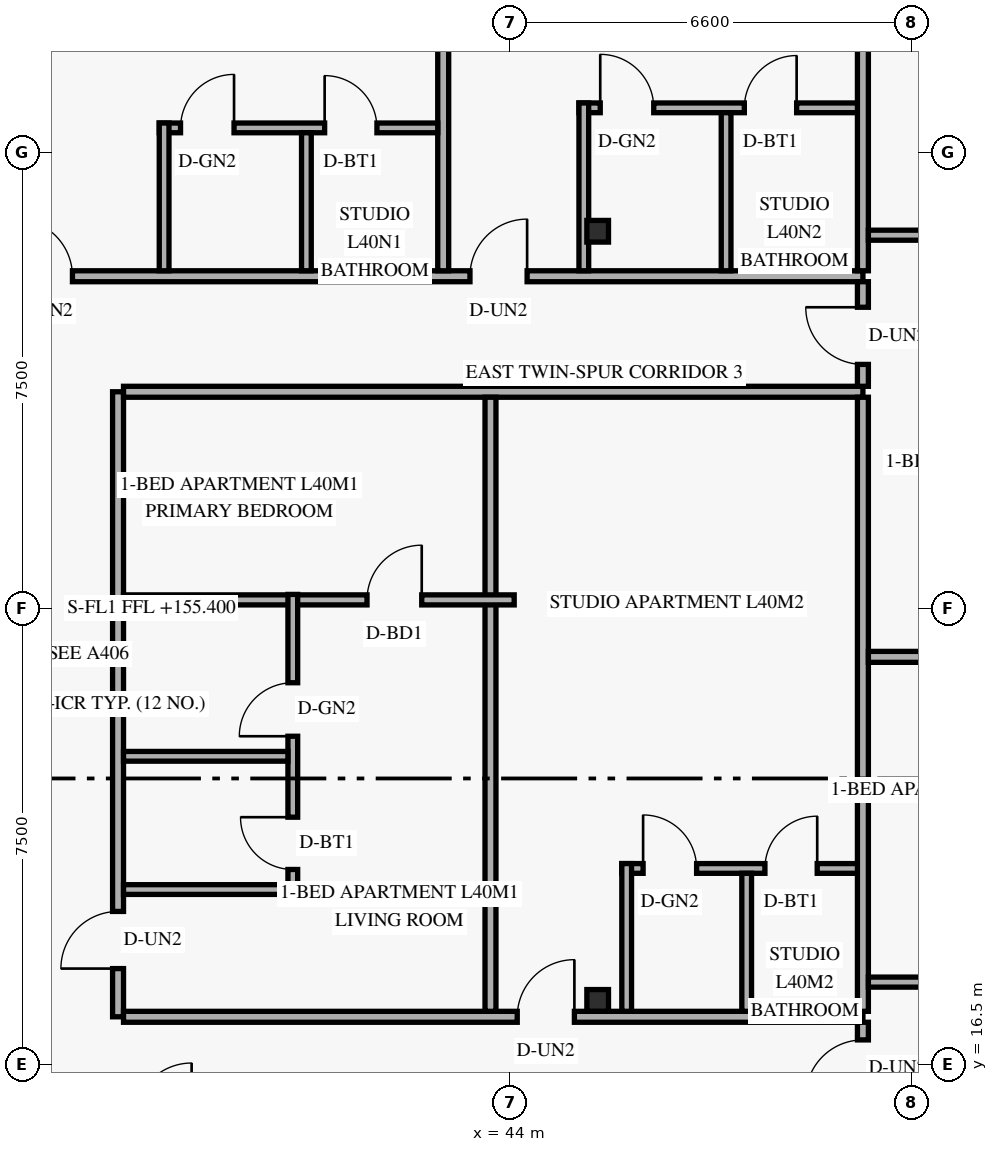
"""IFC4 building model, lengths in metres.
Left out: names, types, materials, properties, quantities, classifications, styles, units other than length and angle.
Written with IfcOpenShell. Run it as: python <this file> out.ifc"""

import sys

from ifc_helpers import new_model, si_unit, direction, frame, frame_2d, origin, origin_2d, place, context, subcontext, project, spatial, rectangle, hollow_rectangle, extrude, element, fill, save


model = new_model("IFC4")
c1 = context("Model", 3, precision=1e-05, world=origin(), true_north=direction((0.0, 1.0)))
c2 = subcontext(c1, "Body", "Model", "MODEL_VIEW")
j1 = project(units=[si_unit("LENGTHUNIT", "METRE"), si_unit("PLANEANGLEUNIT", "RADIAN")], contexts=[c1])
p1 = place(None, origin())
s1 = spatial("IfcSite", under=j1, at=p1, CompositionType="ELEMENT")
p2 = place(p1, origin())
s2 = spatial("IfcBuilding", under=s1, at=p2, CompositionType="ELEMENT")
p3 = place(p2, frame((0.0, 0.0, 155.4)))
s3 = spatial("IfcBuildingStorey", under=s2, at=p3, CompositionType="ELEMENT", Elevation=155.4)
for number, where, z_axis, x_axis in (
    (1, (45.375, 17.55, 0.0), (0.035, 0.0, 0.999), (0.0, 1.0, 0.0)),
    (2, (45.375, 30.2, 0.0), (0.035, 0.0, 0.999), (0.0, 1.0, 0.0)),
):
    element("IfcColumn", number, at=place(p3, frame(where, z_axis=z_axis, x_axis=x_axis)), inside=s3, PredefinedType="COLUMN", context=c2, shape_type="SweptSolid", body=[
        extrude(hollow_rectangle(XDim=0.356, YDim=0.356, WallThickness=0.016, at=origin_2d()), origin(), (0.0, 0.0, 1.0), 3.602),
    ])
p4 = place(p3, frame((37.55, 17.28, 0.0), z_axis=(0.0, 0.0, 1.0), x_axis=(0.0, 1.0, 0.0)))
e3 = element("IfcWall", 3, at=p4, inside=s3, PredefinedType="STANDARD", context=c2, shape_type="SweptSolid", body=[
    extrude(rectangle(XDim=10.28, YDim=0.18, at=frame_2d((5.14, 0.0))), origin(), (0.0, 0.0, 1.0), 2.73),
])
p5 = place(p4, frame((0.793, 0.0, 0.0)))
e4 = element("IfcOpeningElement", 4, at=p5, cuts=e3, PredefinedType="OPENING", context=c2, shape_type="SweptSolid", body=[
    extrude(rectangle(XDim=0.94, YDim=2.15, at=frame_2d((0.47, 1.075))), frame((0.0, 0.1, 0.0), z_axis=(0.0, -1.0, 0.0), x_axis=(1.0, 0.0, 0.0)), (0.0, 0.0, 1.0), 0.2),
])
p6 = place(p3, frame((37.64, 17.28, 0.0), z_axis=(0.0, 0.0, 1.0), x_axis=(1.0, 0.0, 0.0)))
e5 = element("IfcWall", 5, at=p6, inside=s3, PredefinedType="STANDARD", context=c2, shape_type="SweptSolid", body=[
    extrude(rectangle(XDim=12.16, YDim=0.18, at=frame_2d((6.08, 0.0))), origin(), (0.0, 0.0, 1.0), 2.73),
])
p7 = place(p6, frame((6.475, 0.0, 0.0)))
e6 = element("IfcOpeningElement", 6, at=p7, cuts=e5, PredefinedType="OPENING", context=c2, shape_type="SweptSolid", body=[
    extrude(rectangle(XDim=0.94, YDim=2.15, at=frame_2d((0.47, 1.075))), frame((0.0, 0.1, 0.0), z_axis=(0.0, -1.0, 0.0), x_axis=(1.0, 0.0, 0.0)), (0.0, 0.0, 1.0), 0.2),
])
p8 = place(p3, frame((37.64, 27.56, 0.0), z_axis=(0.0, 0.0, 1.0), x_axis=(1.0, 0.0, 0.0)))
e7 = element("IfcWall", 7, at=p8, inside=s3, PredefinedType="STANDARD", context=c2, shape_type="SweptSolid", body=[
    extrude(rectangle(XDim=12.16, YDim=0.18, at=frame_2d((6.08, 0.0))), origin(), (0.0, 0.0, 1.0), 2.73),
])
p9 = place(p3, frame((35.51, 29.46, 0.0), z_axis=(0.0, 0.0, 1.0), x_axis=(1.0, 0.0, 0.0)))
e8 = element("IfcWall", 8, at=p9, inside=s3, PredefinedType="STANDARD", context=c2, shape_type="SweptSolid", body=[
    extrude(rectangle(XDim=14.29, YDim=0.18, at=frame_2d((7.145, 0.0))), origin(), (0.0, 0.0, 1.0), 2.73),
])
p10 = place(p9, frame((0.35, 0.0, 0.0)))
e9 = element("IfcOpeningElement", 9, at=p10, cuts=e8, PredefinedType="OPENING", context=c2, shape_type="SweptSolid", body=[
    extrude(rectangle(XDim=0.94, YDim=2.15, at=frame_2d((0.47, 1.075))), frame((0.0, 0.1, 0.0), z_axis=(0.0, -1.0, 0.0), x_axis=(1.0, 0.0, 0.0)), (0.0, 0.0, 1.0), 0.2),
])
p11 = place(p9, frame((7.828, 0.0, 0.0)))
e10 = element("IfcOpeningElement", 10, at=p11, cuts=e8, PredefinedType="OPENING", context=c2, shape_type="SweptSolid", body=[
    extrude(rectangle(XDim=0.94, YDim=2.15, at=frame_2d((0.47, 1.075))), frame((0.0, 0.1, 0.0), z_axis=(0.0, -1.0, 0.0), x_axis=(1.0, 0.0, 0.0)), (0.0, 0.0, 1.0), 0.2),
])
p12 = place(p3, frame((42.898, 29.55, 0.0), z_axis=(0.0, 0.0, 1.0), x_axis=(0.0, 1.0, 0.0)))
e11 = element("IfcWall", 11, at=p12, inside=s3, PredefinedType="PARTITIONING", context=c2, shape_type="SweptSolid", body=[
    extrude(rectangle(XDim=14.17, YDim=0.18, at=frame_2d((7.085, 0.0))), origin(), (0.0, 0.0, 1.0), 2.73),
])
p13 = place(p3, frame((38.228, 31.9, 0.0), z_axis=(0.0, 0.0, 1.0), x_axis=(1.0, 0.0, 0.0)))
e12 = element("IfcWall", 12, at=p13, inside=s3, PredefinedType="PLUMBINGWALL", context=c2, shape_type="SweptSolid", body=[
    extrude(rectangle(XDim=4.58, YDim=0.16, at=frame_2d((2.29, 0.0))), origin(), (0.0, 0.0, 1.0), 3.36),
])
p14 = place(p13, frame((0.35, 0.0, 0.0)))
e13 = element("IfcOpeningElement", 13, at=p14, cuts=e12, PredefinedType="OPENING", context=c2, shape_type="SweptSolid", body=[
    extrude(rectangle(XDim=0.88, YDim=2.12, at=frame_2d((0.44, 1.06))), frame((0.0, 0.09, 0.0), z_axis=(0.0, -1.0, 0.0), x_axis=(1.0, 0.0, 0.0)), (0.0, 0.0, 1.0), 0.18),
])
p15 = place(p13, frame((2.72, 0.0, 0.0)))
e14 = element("IfcOpeningElement", 14, at=p15, cuts=e12, PredefinedType="OPENING", context=c2, shape_type="SweptSolid", body=[
    extrude(rectangle(XDim=0.86, YDim=2.12, at=frame_2d((0.43, 1.06))), frame((0.0, 0.09, 0.0), z_axis=(0.0, -1.0, 0.0), x_axis=(1.0, 0.0, 0.0)), (0.0, 0.0, 1.0), 0.18),
])
p16 = place(p3, frame((38.308, 29.55, 0.0), z_axis=(0.0, 0.0, 1.0), x_axis=(0.0, 1.0, 0.0)))
e15 = element("IfcWall", 15, at=p16, inside=s3, PredefinedType="PLUMBINGWALL", context=c2, shape_type="SweptSolid", body=[
    extrude(rectangle(XDim=2.43, YDim=0.16, at=frame_2d((1.215, 0.0))), origin(), (0.0, 0.0, 1.0), 2.73),
])
p17 = place(p3, frame((40.648, 29.55, 0.0), z_axis=(0.0, 0.0, 1.0), x_axis=(0.0, 1.0, 0.0)))
e16 = element("IfcWall", 16, at=p17, inside=s3, PredefinedType="PLUMBINGWALL", context=c2, shape_type="SweptSolid", body=[
    extrude(rectangle(XDim=2.27, YDim=0.16, at=frame_2d((1.135, 0.0))), origin(), (0.0, 0.0, 1.0), 2.73),
])
p18 = place(p3, frame((45.13, 32.23, 0.0), z_axis=(0.0, 0.0, 1.0), x_axis=(1.0, 0.0, 0.0)))
e17 = element("IfcWall", 17, at=p18, inside=s3, PredefinedType="PLUMBINGWALL", context=c2, shape_type="SweptSolid", body=[
    extrude(rectangle(XDim=4.67, YDim=0.16, at=frame_2d((2.335, 0.0))), origin(), (0.0, 0.0, 1.0), 2.73),
])
p19 = place(p18, frame((0.35, 0.0, 0.0)))
e18 = element("IfcOpeningElement", 18, at=p19, cuts=e17, PredefinedType="OPENING", context=c2, shape_type="SweptSolid", body=[
    extrude(rectangle(XDim=0.88, YDim=2.12, at=frame_2d((0.44, 1.06))), frame((0.0, 0.09, 0.0), z_axis=(0.0, -1.0, 0.0), x_axis=(1.0, 0.0, 0.0)), (0.0, 0.0, 1.0), 0.18),
])
p20 = place(p18, frame((2.72, 0.0, 0.0)))
e19 = element("IfcOpeningElement", 19, at=p20, cuts=e17, PredefinedType="OPENING", context=c2, shape_type="SweptSolid", body=[
    extrude(rectangle(XDim=0.86, YDim=2.12, at=frame_2d((0.43, 1.06))), frame((0.0, 0.09, 0.0), z_axis=(0.0, -1.0, 0.0), x_axis=(1.0, 0.0, 0.0)), (0.0, 0.0, 1.0), 0.18),
])
p21 = place(p3, frame((45.21, 29.55, 0.0), z_axis=(0.0, 0.0, 1.0), x_axis=(0.0, 1.0, 0.0)))
e20 = element("IfcWall", 20, at=p21, inside=s3, PredefinedType="PLUMBINGWALL", context=c2, shape_type="SweptSolid", body=[
    extrude(rectangle(XDim=2.76, YDim=0.16, at=frame_2d((1.38, 0.0))), origin(), (0.0, 0.0, 1.0), 2.73),
])
p22 = place(p3, frame((47.55, 29.55, 0.0), z_axis=(0.0, 0.0, 1.0), x_axis=(0.0, 1.0, 0.0)))
e21 = element("IfcWall", 21, at=p22, inside=s3, PredefinedType="PLUMBINGWALL", context=c2, shape_type="SweptSolid", body=[
    extrude(rectangle(XDim=2.6, YDim=0.16, at=frame_2d((1.3, 0.0))), origin(), (0.0, 0.0, 1.0), 2.73),
])
p23 = place(p3, frame((43.675, 17.37, 0.0), z_axis=(0.0, 0.0, 1.0), x_axis=(0.0, 1.0, 0.0)))
e22 = element("IfcWall", 22, at=p23, inside=s3, PredefinedType="PARTITIONING", context=c2, shape_type="SweptSolid", body=[
    extrude(rectangle(XDim=10.1, YDim=0.18, at=frame_2d((5.05, 0.0))), origin(), (0.0, 0.0, 1.0), 2.73),
])
p24 = place(p3, frame((37.64, 24.137, 0.0), z_axis=(0.0, 0.0, 1.0), x_axis=(1.0, 0.0, 0.0)))
e23 = element("IfcWall", 23, at=p24, inside=s3, PredefinedType="PARTITIONING", context=c2, shape_type="SweptSolid", body=[
    extrude(rectangle(XDim=6.425, YDim=0.165, at=frame_2d((3.212, 0.0))), origin(), (0.0, 0.0, 1.0), 3.36),
])
p25 = place(p24, frame((4.004, 0.0, 0.0)))
e24 = element("IfcOpeningElement", 24, at=p25, cuts=e23, PredefinedType="OPENING", context=c2, shape_type="SweptSolid", body=[
    extrude(rectangle(XDim=0.9, YDim=2.14, at=frame_2d((0.45, 1.07))), frame((0.0, 0.093, 0.0), z_axis=(0.0, -1.0, 0.0), x_axis=(1.0, 0.0, 0.0)), (0.0, 0.0, 1.0), 0.185),
])
p26 = place(p3, frame((37.64, 19.373, 0.0), z_axis=(0.0, 0.0, 1.0), x_axis=(1.0, 0.0, 0.0)))
e25 = element("IfcWall", 25, at=p26, inside=s3, PredefinedType="PLUMBINGWALL", context=c2, shape_type="SweptSolid", body=[
    extrude(rectangle(XDim=2.864, YDim=0.16, at=frame_2d((1.432, 0.0))), origin(), (0.0, 0.0, 1.0), 3.36),
])
p27 = place(p3, frame((40.424, 19.283, 0.0), z_axis=(0.0, 0.0, 1.0), x_axis=(0.0, 1.0, 0.0)))
e26 = element("IfcWall", 26, at=p27, inside=s3, PredefinedType="PLUMBINGWALL", context=c2, shape_type="SweptSolid", body=[
    extrude(rectangle(XDim=4.944, YDim=0.16, at=frame_2d((2.472, 0.0))), origin(), (0.0, 0.0, 1.0), 3.36),
])
p28 = place(p27, frame((0.42, 0.0, 0.0)))
e27 = element("IfcOpeningElement", 27, at=p28, cuts=e26, PredefinedType="OPENING", context=c2, shape_type="SweptSolid", body=[
    extrude(rectangle(XDim=0.86, YDim=2.12, at=frame_2d((0.43, 1.06))), frame((0.0, 0.09, 0.0), z_axis=(0.0, -1.0, 0.0), x_axis=(1.0, 0.0, 0.0)), (0.0, 0.0, 1.0), 0.18),
])
p29 = place(p27, frame((2.611, 0.0, 0.0)))
e28 = element("IfcOpeningElement", 28, at=p29, cuts=e26, PredefinedType="OPENING", context=c2, shape_type="SweptSolid", body=[
    extrude(rectangle(XDim=0.88, YDim=2.12, at=frame_2d((0.44, 1.06))), frame((0.0, 0.09, 0.0), z_axis=(0.0, -1.0, 0.0), x_axis=(1.0, 0.0, 0.0)), (0.0, 0.0, 1.0), 0.18),
])
p30 = place(p3, frame((37.64, 21.564, 0.0), z_axis=(0.0, 0.0, 1.0), x_axis=(1.0, 0.0, 0.0)))
e29 = element("IfcWall", 29, at=p30, inside=s3, PredefinedType="PLUMBINGWALL", context=c2, shape_type="SweptSolid", body=[
    extrude(rectangle(XDim=2.704, YDim=0.16, at=frame_2d((1.352, 0.0))), origin(), (0.0, 0.0, 1.0), 3.36),
])
p31 = place(p3, frame((45.835, 19.72, 0.0), z_axis=(0.0, 0.0, 1.0), x_axis=(1.0, 0.0, 0.0)))
e30 = element("IfcWall", 30, at=p31, inside=s3, PredefinedType="PLUMBINGWALL", context=c2, shape_type="SweptSolid", body=[
    extrude(rectangle(XDim=3.965, YDim=0.16, at=frame_2d((1.982, 0.0))), origin(), (0.0, 0.0, 1.0), 3.36),
])
p32 = place(p31, frame((0.35, 0.0, 0.0)))
e31 = element("IfcOpeningElement", 31, at=p32, cuts=e30, PredefinedType="OPENING", context=c2, shape_type="SweptSolid", body=[
    extrude(rectangle(XDim=0.88, YDim=2.12, at=frame_2d((0.44, 1.06))), frame((0.0, 0.09, 0.0), z_axis=(0.0, -1.0, 0.0), x_axis=(1.0, 0.0, 0.0)), (0.0, 0.0, 1.0), 0.18),
])
p33 = place(p31, frame((2.354, 0.0, 0.0)))
e32 = element("IfcOpeningElement", 32, at=p33, cuts=e30, PredefinedType="OPENING", context=c2, shape_type="SweptSolid", body=[
    extrude(rectangle(XDim=0.86, YDim=2.12, at=frame_2d((0.43, 1.06))), frame((0.0, 0.09, 0.0), z_axis=(0.0, -1.0, 0.0), x_axis=(1.0, 0.0, 0.0)), (0.0, 0.0, 1.0), 0.18),
])
p34 = place(p3, frame((45.915, 17.37, 0.0), z_axis=(0.0, 0.0, 1.0), x_axis=(0.0, 1.0, 0.0)))
e33 = element("IfcWall", 33, at=p34, inside=s3, PredefinedType="PLUMBINGWALL", context=c2, shape_type="SweptSolid", body=[
    extrude(rectangle(XDim=2.43, YDim=0.16, at=frame_2d((1.215, 0.0))), origin(), (0.0, 0.0, 1.0), 2.73),
])
p35 = place(p3, frame((47.888, 17.37, 0.0), z_axis=(0.0, 0.0, 1.0), x_axis=(0.0, 1.0, 0.0)))
e34 = element("IfcWall", 34, at=p35, inside=s3, PredefinedType="PLUMBINGWALL", context=c2, shape_type="SweptSolid", body=[
    extrude(rectangle(XDim=2.27, YDim=0.16, at=frame_2d((1.135, 0.0))), origin(), (0.0, 0.0, 1.0), 2.73),
])
p36 = place(p3, frame((49.8, 15.67, 0.0), z_axis=(0.0, 0.0, 1.0), x_axis=(0.0, 1.0, 0.0)))
e35 = element("IfcWall", 35, at=p36, inside=s3, PredefinedType="STANDARD", context=c2, shape_type="SweptSolid", body=[
    extrude(rectangle(XDim=1.52, YDim=0.18, at=frame_2d((0.76, 0.0))), origin(), (0.0, 0.0, 1.0), 3.36),
])
p37 = place(p36, frame((0.29, 0.0, 0.0)))
e36 = element("IfcOpeningElement", 36, at=p37, cuts=e35, PredefinedType="OPENING", context=c2, shape_type="SweptSolid", body=[
    extrude(rectangle(XDim=0.94, YDim=2.15, at=frame_2d((0.47, 1.075))), frame((0.0, 0.1, 0.0), z_axis=(0.0, -1.0, 0.0), x_axis=(1.0, 0.0, 0.0)), (0.0, 0.0, 1.0), 0.2),
])
p38 = place(p3, frame((49.8, 27.65, 0.0), z_axis=(0.0, 0.0, 1.0), x_axis=(0.0, 1.0, 0.0)))
e37 = element("IfcWall", 37, at=p38, inside=s3, PredefinedType="STANDARD", context=c2, shape_type="SweptSolid", body=[
    extrude(rectangle(XDim=1.72, YDim=0.18, at=frame_2d((0.86, 0.0))), origin(), (0.0, 0.0, 1.0), 3.36),
])
p39 = place(p38, frame((0.36, 0.0, 0.0)))
e38 = element("IfcOpeningElement", 38, at=p39, cuts=e37, PredefinedType="OPENING", context=c2, shape_type="SweptSolid", body=[
    extrude(rectangle(XDim=0.94, YDim=2.15, at=frame_2d((0.47, 1.075))), frame((0.0, 0.1, 0.0), z_axis=(0.0, -1.0, 0.0), x_axis=(1.0, 0.0, 0.0)), (0.0, 0.0, 1.0), 0.2),
])
p40 = place(p3, frame((49.8, 17.37, 0.0), z_axis=(0.0, 0.0, 1.0), x_axis=(0.0, 1.0, 0.0)))
e39 = element("IfcWall", 39, at=p40, inside=s3, PredefinedType="PARTITIONING", context=c2, shape_type="SweptSolid", body=[
    extrude(rectangle(XDim=10.1, YDim=0.18, at=frame_2d((5.05, 0.0))), origin(), (0.0, 0.0, 1.0), 2.73),
])
p41 = place(p3, frame((49.8, 29.55, 0.0), z_axis=(0.0, 0.0, 1.0), x_axis=(0.0, 1.0, 0.0)))
e40 = element("IfcWall", 40, at=p41, inside=s3, PredefinedType="PARTITIONING", context=c2, shape_type="SweptSolid", body=[
    extrude(rectangle(XDim=14.17, YDim=0.18, at=frame_2d((7.085, 0.0))), origin(), (0.0, 0.0, 1.0), 2.73),
])
p42 = place(p3, frame((49.89, 23.2, 0.0), z_axis=(0.0, 0.0, 1.0), x_axis=(1.0, 0.0, 0.0)))
e41 = element("IfcWall", 41, at=p42, inside=s3, PredefinedType="PARTITIONING", context=c2, shape_type="SweptSolid", body=[
    extrude(rectangle(XDim=8.43, YDim=0.18, at=frame_2d((4.215, 0.0))), origin(), (0.0, 0.0, 1.0), 2.879),
])
p43 = place(p3, frame((49.89, 17.851, 0.0), z_axis=(0.0, 0.0, 1.0), x_axis=(1.0, 0.0, 0.0)))
e42 = element("IfcWall", 42, at=p43, inside=s3, PredefinedType="PARTITIONING", context=c2, shape_type="SweptSolid", body=[
    extrude(rectangle(XDim=8.43, YDim=0.165, at=frame_2d((4.215, 0.0))), origin(), (0.0, 0.0, 1.0), 2.879),
])
p44 = place(p43, frame((4.19, 0.0, 0.0)))
e43 = element("IfcOpeningElement", 43, at=p44, cuts=e42, PredefinedType="OPENING", context=c2, shape_type="SweptSolid", body=[
    extrude(rectangle(XDim=0.95, YDim=2.15, at=frame_2d((0.475, 1.075))), frame((0.0, 0.093, 0.0), z_axis=(0.0, -1.0, 0.0), x_axis=(1.0, 0.0, 0.0)), (0.0, 0.0, 1.0), 0.185),
])
p45 = place(p3, frame((49.89, 30.135, 0.0), z_axis=(0.0, 0.0, 1.0), x_axis=(1.0, 0.0, 0.0)))
e44 = element("IfcWall", 44, at=p45, inside=s3, PredefinedType="PARTITIONING", context=c2, shape_type="SweptSolid", body=[
    extrude(rectangle(XDim=8.43, YDim=0.165, at=frame_2d((4.215, 0.0))), origin(), (0.0, 0.0, 1.0), 2.73),
])
p46 = place(p45, frame((4.19, 0.0, 0.0)))
e45 = element("IfcOpeningElement", 45, at=p46, cuts=e44, PredefinedType="OPENING", context=c2, shape_type="SweptSolid", body=[
    extrude(rectangle(XDim=0.95, YDim=2.15, at=frame_2d((0.475, 1.075))), frame((0.0, 0.093, 0.0), z_axis=(0.0, -1.0, 0.0), x_axis=(1.0, 0.0, 0.0)), (0.0, 0.0, 1.0), 0.185),
])
p47 = place(p10, origin())
e46 = element("IfcDoor", 46, at=p47, inside=s3, OperationType="SINGLE_SWING_LEFT", PredefinedType="DOOR", context=c2, shape_type="SweptSolid", body=[
    extrude(rectangle(XDim=0.94, YDim=2.15, at=frame_2d((0.47, 1.075))), frame((0.0, 0.025, 0.0), z_axis=(0.0, -1.0, 0.0), x_axis=(1.0, 0.0, 0.0)), (0.0, 0.0, 1.0), 0.05),
])
fill(e9, e46)
p48 = place(p14, origin())
e47 = element("IfcDoor", 47, at=p48, inside=s3, OperationType="SINGLE_SWING_RIGHT", PredefinedType="DOOR", context=c2, shape_type="SweptSolid", body=[
    extrude(rectangle(XDim=0.88, YDim=2.12, at=frame_2d((0.44, 1.06))), frame((0.0, 0.025, 0.0), z_axis=(0.0, -1.0, 0.0), x_axis=(1.0, 0.0, 0.0)), (0.0, 0.0, 1.0), 0.05),
])
fill(e13, e47)
p49 = place(p15, origin())
e48 = element("IfcDoor", 48, at=p49, inside=s3, OperationType="SINGLE_SWING_LEFT", PredefinedType="DOOR", context=c2, shape_type="SweptSolid", body=[
    extrude(rectangle(XDim=0.86, YDim=2.12, at=frame_2d((0.43, 1.06))), frame((0.0, 0.025, 0.0), z_axis=(0.0, -1.0, 0.0), x_axis=(1.0, 0.0, 0.0)), (0.0, 0.0, 1.0), 0.05),
])
fill(e14, e48)
p50 = place(p11, origin())
e49 = element("IfcDoor", 49, at=p50, inside=s3, OperationType="SINGLE_SWING_RIGHT", PredefinedType="DOOR", context=c2, shape_type="SweptSolid", body=[
    extrude(rectangle(XDim=0.94, YDim=2.15, at=frame_2d((0.47, 1.075))), frame((0.0, 0.025, 0.0), z_axis=(0.0, -1.0, 0.0), x_axis=(1.0, 0.0, 0.0)), (0.0, 0.0, 1.0), 0.05),
])
fill(e10, e49)
p51 = place(p19, origin())
e50 = element("IfcDoor", 50, at=p51, inside=s3, OperationType="SINGLE_SWING_LEFT", PredefinedType="DOOR", context=c2, shape_type="SweptSolid", body=[
    extrude(rectangle(XDim=0.88, YDim=2.12, at=frame_2d((0.44, 1.06))), frame((0.0, 0.025, 0.0), z_axis=(0.0, -1.0, 0.0), x_axis=(1.0, 0.0, 0.0)), (0.0, 0.0, 1.0), 0.05),
])
fill(e18, e50)
p52 = place(p20, origin())
e51 = element("IfcDoor", 51, at=p52, inside=s3, OperationType="SINGLE_SWING_RIGHT", PredefinedType="DOOR", context=c2, shape_type="SweptSolid", body=[
    extrude(rectangle(XDim=0.86, YDim=2.12, at=frame_2d((0.43, 1.06))), frame((0.0, 0.025, 0.0), z_axis=(0.0, -1.0, 0.0), x_axis=(1.0, 0.0, 0.0)), (0.0, 0.0, 1.0), 0.05),
])
fill(e19, e51)
p53 = place(p5, origin())
e52 = element("IfcDoor", 52, at=p53, inside=s3, OperationType="SINGLE_SWING_LEFT", PredefinedType="DOOR", context=c2, shape_type="SweptSolid", body=[
    extrude(rectangle(XDim=0.94, YDim=2.15, at=frame_2d((0.47, 1.075))), frame((0.0, 0.025, 0.0), z_axis=(0.0, -1.0, 0.0), x_axis=(1.0, 0.0, 0.0)), (0.0, 0.0, 1.0), 0.05),
])
fill(e4, e52)
p54 = place(p28, origin())
e53 = element("IfcDoor", 53, at=p54, inside=s3, OperationType="SINGLE_SWING_RIGHT", PredefinedType="DOOR", context=c2, shape_type="SweptSolid", body=[
    extrude(rectangle(XDim=0.86, YDim=2.12, at=frame_2d((0.43, 1.06))), frame((0.0, 0.025, 0.0), z_axis=(0.0, -1.0, 0.0), x_axis=(1.0, 0.0, 0.0)), (0.0, 0.0, 1.0), 0.05),
])
fill(e27, e53)
p55 = place(p29, origin())
e54 = element("IfcDoor", 54, at=p55, inside=s3, OperationType="SINGLE_SWING_LEFT", PredefinedType="DOOR", context=c2, shape_type="SweptSolid", body=[
    extrude(rectangle(XDim=0.88, YDim=2.12, at=frame_2d((0.44, 1.06))), frame((0.0, 0.025, 0.0), z_axis=(0.0, -1.0, 0.0), x_axis=(1.0, 0.0, 0.0)), (0.0, 0.0, 1.0), 0.05),
])
fill(e28, e54)
p56 = place(p25, origin())
e55 = element("IfcDoor", 55, at=p56, inside=s3, OperationType="SINGLE_SWING_RIGHT", PredefinedType="DOOR", context=c2, shape_type="SweptSolid", body=[
    extrude(rectangle(XDim=0.9, YDim=2.14, at=frame_2d((0.45, 1.07))), frame((0.0, 0.025, 0.0), z_axis=(0.0, -1.0, 0.0), x_axis=(1.0, 0.0, 0.0)), (0.0, 0.0, 1.0), 0.05),
])
fill(e24, e55)
p57 = place(p7, origin())
e56 = element("IfcDoor", 56, at=p57, inside=s3, OperationType="SINGLE_SWING_RIGHT", PredefinedType="DOOR", context=c2, shape_type="SweptSolid", body=[
    extrude(rectangle(XDim=0.94, YDim=2.15, at=frame_2d((0.47, 1.075))), frame((0.0, 0.025, 0.0), z_axis=(0.0, -1.0, 0.0), x_axis=(1.0, 0.0, 0.0)), (0.0, 0.0, 1.0), 0.05),
])
fill(e6, e56)
p58 = place(p32, origin())
e57 = element("IfcDoor", 57, at=p58, inside=s3, OperationType="SINGLE_SWING_LEFT", PredefinedType="DOOR", context=c2, shape_type="SweptSolid", body=[
    extrude(rectangle(XDim=0.88, YDim=2.12, at=frame_2d((0.44, 1.06))), frame((0.0, 0.025, 0.0), z_axis=(0.0, -1.0, 0.0), x_axis=(1.0, 0.0, 0.0)), (0.0, 0.0, 1.0), 0.05),
])
fill(e31, e57)
p59 = place(p33, origin())
e58 = element("IfcDoor", 58, at=p59, inside=s3, OperationType="SINGLE_SWING_RIGHT", PredefinedType="DOOR", context=c2, shape_type="SweptSolid", body=[
    extrude(rectangle(XDim=0.86, YDim=2.12, at=frame_2d((0.43, 1.06))), frame((0.0, 0.025, 0.0), z_axis=(0.0, -1.0, 0.0), x_axis=(1.0, 0.0, 0.0)), (0.0, 0.0, 1.0), 0.05),
])
fill(e32, e58)
p60 = place(p37, origin())
e59 = element("IfcDoor", 59, at=p60, inside=s3, OperationType="SINGLE_SWING_LEFT", PredefinedType="DOOR", context=c2, shape_type="SweptSolid", body=[
    extrude(rectangle(XDim=0.94, YDim=2.15, at=frame_2d((0.47, 1.075))), frame((0.0, 0.025, 0.0), z_axis=(0.0, -1.0, 0.0), x_axis=(1.0, 0.0, 0.0)), (0.0, 0.0, 1.0), 0.05),
])
fill(e36, e59)
p61 = place(p39, origin())
e60 = element("IfcDoor", 60, at=p61, inside=s3, OperationType="SINGLE_SWING_RIGHT", PredefinedType="DOOR", context=c2, shape_type="SweptSolid", body=[
    extrude(rectangle(XDim=0.94, YDim=2.15, at=frame_2d((0.47, 1.075))), frame((0.0, 0.025, 0.0), z_axis=(0.0, -1.0, 0.0), x_axis=(1.0, 0.0, 0.0)), (0.0, 0.0, 1.0), 0.05),
])
fill(e38, e60)
save(model, sys.argv[1])
